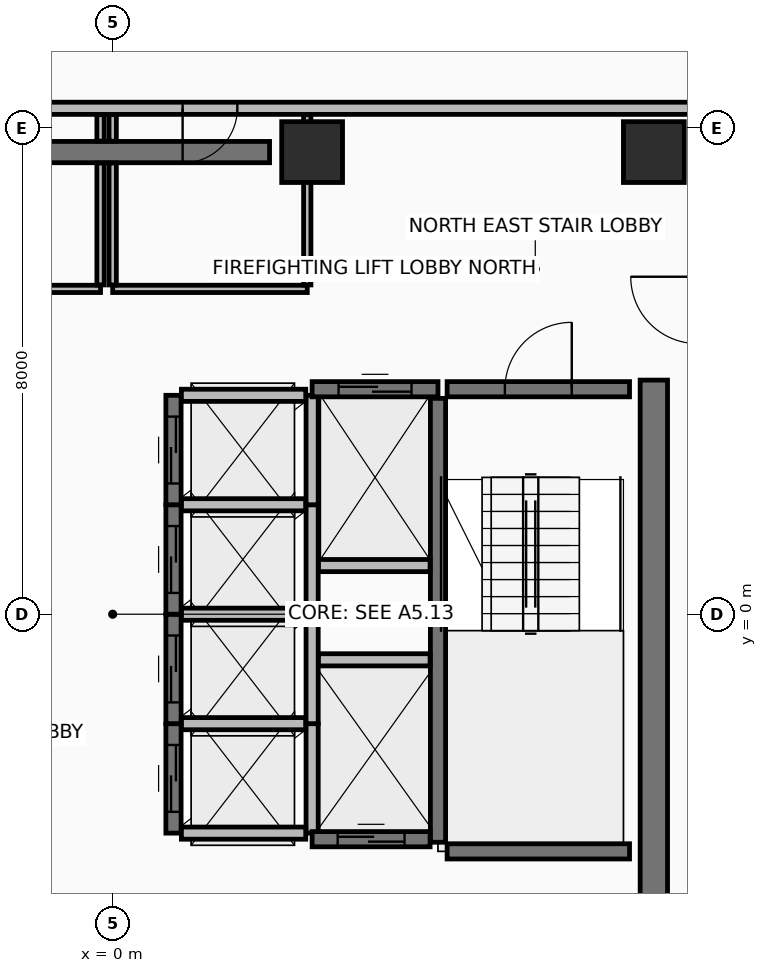
"""IFC4 building model, lengths in metres.
Left out: names, types, materials, properties, quantities, classifications, styles, units other than length and angle.
Written with IfcOpenShell. Run it as: python <this file> out.ifc"""

import sys

from ifc_helpers import new_model, si_unit, direction, frame, frame_2d, origin, origin_2d, place, context, subcontext, project, spatial, rectangle, extrude, element, fill, save


model = new_model("IFC4")
c1 = context("Model", 3, precision=1e-05, world=origin(), true_north=direction((0.0, 1.0)))
c2 = subcontext(c1, "Body", "Model", "MODEL_VIEW")
j1 = project(units=[si_unit("LENGTHUNIT", "METRE"), si_unit("PLANEANGLEUNIT", "RADIAN")], contexts=[c1])
p1 = place(None, origin())
s1 = spatial("IfcSite", under=j1, at=p1, CompositionType="ELEMENT")
p2 = place(p1, origin())
s2 = spatial("IfcBuilding", under=s1, at=p2, CompositionType="ELEMENT")
p3 = place(p2, frame((0.0, 0.0, 294.35)))
s3 = spatial("IfcBuildingStorey", under=s2, at=p3, CompositionType="ELEMENT", Elevation=294.35)
for number, where, z_axis, x_axis in (
    (1, (8.9, 7.6, 0.0), (0.0, 0.0, 1.0), (1.0, 0.0, 0.0)),
    (2, (3.28, 7.6, 0.0), (0.0, 0.0, 1.0), (1.0, 0.0, 0.0)),
):
    element("IfcColumn", number, at=place(p3, frame(where, z_axis=z_axis, x_axis=x_axis)), inside=s3, PredefinedType="COLUMN", context=c2, shape_type="SweptSolid", body=[
        extrude(rectangle(XDim=1.0, YDim=1.0, at=origin_2d()), origin(), (0.0, 0.0, 1.0), 3.65),
    ])
p4 = place(p3, frame((-2.8, 7.6, 0.0), z_axis=(0.0, 0.0, 1.0), x_axis=(1.0, 0.0, 0.0)))
e3 = element("IfcWall", 3, at=p4, inside=s3, PredefinedType="SHEAR", context=c2, shape_type="SweptSolid", body=[
    extrude(rectangle(XDim=5.38, YDim=0.35, at=frame_2d((2.69, 0.0))), origin(), (0.0, 0.0, 1.0), 3.45),
])
p5 = place(p3, frame((8.9, -6.85, 0.0), z_axis=(0.0, 0.0, 1.0), x_axis=(0.0, 1.0, 0.0)))
e4 = element("IfcWall", 4, at=p5, inside=s3, PredefinedType="SHEAR", context=c2, shape_type="SweptSolid", body=[
    extrude(rectangle(XDim=10.7, YDim=0.45, at=frame_2d((5.35, 0.0))), origin(), (0.0, 0.0, 1.0), 3.45),
])
p6 = place(p3, frame((9.62, 8.32, 0.0), z_axis=(0.0, 0.0, 1.0), x_axis=(-1.0, 0.0, 0.0)))
e5 = element("IfcWall", 5, at=p6, inside=s3, PredefinedType="PARTITIONING", context=c2, shape_type="SweptSolid", body=[
    extrude(rectangle(XDim=19.24, YDim=0.2, at=frame_2d((9.62, 0.0))), origin(), (0.0, 0.0, 1.0), 2.945),
])
p7 = place(p6, frame((10.97, 0.0, 0.0)))
e6 = element("IfcOpeningElement", 6, at=p7, cuts=e5, PredefinedType="OPENING", context=c2, shape_type="SweptSolid", body=[
    extrude(rectangle(XDim=0.9, YDim=2.1, at=frame_2d((0.45, 1.05))), frame((0.0, 0.11, 0.0), z_axis=(0.0, -1.0, 0.0), x_axis=(1.0, 0.0, 0.0)), (0.0, 0.0, 1.0), 0.22),
])
p8 = place(p6, frame((7.57, 0.0, 0.0)))
e7 = element("IfcOpeningElement", 7, at=p8, cuts=e5, PredefinedType="OPENING", context=c2, shape_type="SweptSolid", body=[
    extrude(rectangle(XDim=0.9, YDim=2.1, at=frame_2d((0.45, 1.05))), frame((0.0, 0.11, 0.0), z_axis=(0.0, -1.0, 0.0), x_axis=(1.0, 0.0, 0.0)), (0.0, 0.0, 1.0), 0.22),
])
p9 = place(p6, frame((16.245, 0.0, 0.0)))
e8 = element("IfcOpeningElement", 8, at=p9, cuts=e5, PredefinedType="OPENING", context=c2, shape_type="SweptSolid", body=[
    extrude(rectangle(XDim=0.9, YDim=2.1, at=frame_2d((0.45, 1.05))), frame((0.0, 0.11, 0.0), z_axis=(0.0, -1.0, 0.0), x_axis=(1.0, 0.0, 0.0)), (0.0, 0.0, 1.0), 0.22),
])
p10 = place(p6, frame((14.295, 0.0, 0.0)))
e9 = element("IfcOpeningElement", 9, at=p10, cuts=e5, PredefinedType="OPENING", context=c2, shape_type="SweptSolid", body=[
    extrude(rectangle(XDim=0.9, YDim=2.1, at=frame_2d((0.45, 1.05))), frame((0.0, 0.11, 0.0), z_axis=(0.0, -1.0, 0.0), x_axis=(1.0, 0.0, 0.0)), (0.0, 0.0, 1.0), 0.22),
])
p11 = place(p3, frame((5.35, -3.75, 0.0), z_axis=(0.0, 0.0, 1.0), x_axis=(0.0, 1.0, 0.0)))
e10 = element("IfcWall", 10, at=p11, inside=s3, PredefinedType="SHEAR", context=c2, shape_type="SweptSolid", body=[
    extrude(rectangle(XDim=7.3, YDim=0.25, at=frame_2d((3.65, 0.0))), origin(), (0.0, 0.0, 1.0), 3.45),
])
p12 = place(p3, frame((5.5, 3.7, 0.0), z_axis=(0.0, 0.0, 1.0), x_axis=(1.0, 0.0, 0.0)))
e11 = element("IfcWall", 11, at=p12, inside=s3, PredefinedType="SHEAR", context=c2, shape_type="SweptSolid", body=[
    extrude(rectangle(XDim=3.0, YDim=0.25, at=frame_2d((1.5, 0.0))), origin(), (0.0, 0.0, 1.0), 3.45),
])
p13 = place(p12, frame((0.95, 0.0, 0.0)))
e12 = element("IfcOpeningElement", 12, at=p13, cuts=e11, PredefinedType="OPENING", context=c2, shape_type="SweptSolid", body=[
    extrude(rectangle(XDim=1.1, YDim=2.15, at=frame_2d((0.55, 1.075))), frame((0.0, 0.135, 0.0), z_axis=(0.0, -1.0, 0.0), x_axis=(1.0, 0.0, 0.0)), (0.0, 0.0, 1.0), 0.27),
])
p14 = place(p3, frame((5.5, -3.9, 0.0), z_axis=(0.0, 0.0, 1.0), x_axis=(1.0, 0.0, 0.0)))
e13 = element("IfcWall", 13, at=p14, inside=s3, PredefinedType="SHEAR", context=c2, shape_type="SweptSolid", body=[
    extrude(rectangle(XDim=3.0, YDim=0.25, at=frame_2d((1.5, 0.0))), origin(), (0.0, 0.0, 1.0), 3.45),
])
p15 = place(p3, frame((1.0, -3.6, 0.0), z_axis=(0.0, 0.0, 1.0), x_axis=(0.0, 1.0, 0.0)))
e14 = element("IfcWall", 14, at=p15, inside=s3, PredefinedType="SHEAR", context=c2, shape_type="SweptSolid", body=[
    extrude(rectangle(XDim=1.8, YDim=0.25, at=frame_2d((0.9, 0.0))), origin(), (0.0, 0.0, 1.0), 3.45),
])
p16 = place(p15, frame((0.35, 0.0, 0.0)))
e15 = element("IfcOpeningElement", 15, at=p16, cuts=e14, PredefinedType="OPENING", context=c2, shape_type="SweptSolid", body=[
    extrude(rectangle(XDim=1.1, YDim=2.2, at=frame_2d((0.55, 1.1))), frame((0.0, 0.135, 0.0), z_axis=(0.0, -1.0, 0.0), x_axis=(1.0, 0.0, 0.0)), (0.0, 0.0, 1.0), 0.27),
])
p17 = place(p3, frame((3.28, -3.6, 0.0), z_axis=(0.0, 0.0, 1.0), x_axis=(0.0, 1.0, 0.0)))
e16 = element("IfcWall", 16, at=p17, inside=s3, PredefinedType="PARTITIONING", context=c2, shape_type="SweptSolid", body=[
    extrude(rectangle(XDim=1.8, YDim=0.2, at=frame_2d((0.9, 0.0))), origin(), (0.0, 0.0, 1.0), 3.45),
])
for number, where, z_axis, x_axis in (
    (17, (1.13, -3.6, 0.0), (0.0, 0.0, 1.0), (1.0, 0.0, 0.0)),
    (18, (1.13, -1.8, 0.0), (0.0, 0.0, 1.0), (1.0, 0.0, 0.0)),
):
    element("IfcWall", number, at=place(p3, frame(where, z_axis=z_axis, x_axis=x_axis)), inside=s3, PredefinedType="PARTITIONING", context=c2, shape_type="SweptSolid", body=[
        extrude(rectangle(XDim=2.045, YDim=0.2, at=frame_2d((1.022, 0.0))), origin(), (0.0, 0.0, 1.0), 3.45),
    ])
p18 = place(p3, frame((1.0, -1.8, 0.0), z_axis=(0.0, 0.0, 1.0), x_axis=(0.0, 1.0, 0.0)))
e19 = element("IfcWall", 19, at=p18, inside=s3, PredefinedType="SHEAR", context=c2, shape_type="SweptSolid", body=[
    extrude(rectangle(XDim=1.8, YDim=0.25, at=frame_2d((0.9, 0.0))), origin(), (0.0, 0.0, 1.0), 3.45),
])
p19 = place(p18, frame((0.35, 0.0, 0.0)))
e20 = element("IfcOpeningElement", 20, at=p19, cuts=e19, PredefinedType="OPENING", context=c2, shape_type="SweptSolid", body=[
    extrude(rectangle(XDim=1.1, YDim=2.2, at=frame_2d((0.55, 1.1))), frame((0.0, 0.135, 0.0), z_axis=(0.0, -1.0, 0.0), x_axis=(1.0, 0.0, 0.0)), (0.0, 0.0, 1.0), 0.27),
])
p20 = place(p3, frame((3.28, -1.8, 0.0), z_axis=(0.0, 0.0, 1.0), x_axis=(0.0, 1.0, 0.0)))
e21 = element("IfcWall", 21, at=p20, inside=s3, PredefinedType="PARTITIONING", context=c2, shape_type="SweptSolid", body=[
    extrude(rectangle(XDim=1.8, YDim=0.2, at=frame_2d((0.9, 0.0))), origin(), (0.0, 0.0, 1.0), 3.45),
])
p21 = place(p3, frame((1.13, 0.0, 0.0), z_axis=(0.0, 0.0, 1.0), x_axis=(1.0, 0.0, 0.0)))
e22 = element("IfcWall", 22, at=p21, inside=s3, PredefinedType="PARTITIONING", context=c2, shape_type="SweptSolid", body=[
    extrude(rectangle(XDim=2.045, YDim=0.2, at=frame_2d((1.022, 0.0))), origin(), (0.0, 0.0, 1.0), 3.45),
])
p22 = place(p3, frame((1.0, 0.0, 0.0), z_axis=(0.0, 0.0, 1.0), x_axis=(0.0, 1.0, 0.0)))
e23 = element("IfcWall", 23, at=p22, inside=s3, PredefinedType="SHEAR", context=c2, shape_type="SweptSolid", body=[
    extrude(rectangle(XDim=1.8, YDim=0.25, at=frame_2d((0.9, 0.0))), origin(), (0.0, 0.0, 1.0), 3.45),
])
p23 = place(p22, frame((0.35, 0.0, 0.0)))
e24 = element("IfcOpeningElement", 24, at=p23, cuts=e23, PredefinedType="OPENING", context=c2, shape_type="SweptSolid", body=[
    extrude(rectangle(XDim=1.1, YDim=2.2, at=frame_2d((0.55, 1.1))), frame((0.0, 0.135, 0.0), z_axis=(0.0, -1.0, 0.0), x_axis=(1.0, 0.0, 0.0)), (0.0, 0.0, 1.0), 0.27),
])
p24 = place(p3, frame((3.28, 0.0, 0.0), z_axis=(0.0, 0.0, 1.0), x_axis=(0.0, 1.0, 0.0)))
e25 = element("IfcWall", 25, at=p24, inside=s3, PredefinedType="PARTITIONING", context=c2, shape_type="SweptSolid", body=[
    extrude(rectangle(XDim=1.8, YDim=0.2, at=frame_2d((0.9, 0.0))), origin(), (0.0, 0.0, 1.0), 3.45),
])
p25 = place(p3, frame((1.13, 1.8, 0.0), z_axis=(0.0, 0.0, 1.0), x_axis=(1.0, 0.0, 0.0)))
e26 = element("IfcWall", 26, at=p25, inside=s3, PredefinedType="PARTITIONING", context=c2, shape_type="SweptSolid", body=[
    extrude(rectangle(XDim=2.045, YDim=0.2, at=frame_2d((1.022, 0.0))), origin(), (0.0, 0.0, 1.0), 3.45),
])
p26 = place(p3, frame((1.0, 1.8, 0.0), z_axis=(0.0, 0.0, 1.0), x_axis=(0.0, 1.0, 0.0)))
e27 = element("IfcWall", 27, at=p26, inside=s3, PredefinedType="SHEAR", context=c2, shape_type="SweptSolid", body=[
    extrude(rectangle(XDim=1.8, YDim=0.25, at=frame_2d((0.9, 0.0))), origin(), (0.0, 0.0, 1.0), 3.45),
])
p27 = place(p26, frame((0.35, 0.0, 0.0)))
e28 = element("IfcOpeningElement", 28, at=p27, cuts=e27, PredefinedType="OPENING", context=c2, shape_type="SweptSolid", body=[
    extrude(rectangle(XDim=1.1, YDim=2.2, at=frame_2d((0.55, 1.1))), frame((0.0, 0.135, 0.0), z_axis=(0.0, -1.0, 0.0), x_axis=(1.0, 0.0, 0.0)), (0.0, 0.0, 1.0), 0.27),
])
p28 = place(p3, frame((3.28, 1.8, 0.0), z_axis=(0.0, 0.0, 1.0), x_axis=(0.0, 1.0, 0.0)))
e29 = element("IfcWall", 29, at=p28, inside=s3, PredefinedType="PARTITIONING", context=c2, shape_type="SweptSolid", body=[
    extrude(rectangle(XDim=1.8, YDim=0.2, at=frame_2d((0.9, 0.0))), origin(), (0.0, 0.0, 1.0), 3.45),
])
p29 = place(p3, frame((1.13, 3.6, 0.0), z_axis=(0.0, 0.0, 1.0), x_axis=(1.0, 0.0, 0.0)))
e30 = element("IfcWall", 30, at=p29, inside=s3, PredefinedType="PARTITIONING", context=c2, shape_type="SweptSolid", body=[
    extrude(rectangle(XDim=2.045, YDim=0.2, at=frame_2d((1.022, 0.0))), origin(), (0.0, 0.0, 1.0), 2.745),
])
p30 = place(p3, frame((3.28, 3.7, 0.0), z_axis=(0.0, 0.0, 1.0), x_axis=(1.0, 0.0, 0.0)))
e31 = element("IfcWall", 31, at=p30, inside=s3, PredefinedType="SHEAR", context=c2, shape_type="SweptSolid", body=[
    extrude(rectangle(XDim=2.07, YDim=0.25, at=frame_2d((1.035, 0.0))), origin(), (0.0, 0.0, 1.0), 3.45),
])
p31 = place(p30, frame((0.435, 0.0, 0.0)))
e32 = element("IfcOpeningElement", 32, at=p31, cuts=e31, PredefinedType="OPENING", context=c2, shape_type="SweptSolid", body=[
    extrude(rectangle(XDim=1.2, YDim=2.2, at=frame_2d((0.6, 1.1))), frame((0.0, 0.135, 0.0), z_axis=(0.0, -1.0, 0.0), x_axis=(1.0, 0.0, 0.0)), (0.0, 0.0, 1.0), 0.27),
])
p32 = place(p3, frame((3.385, 0.8, 0.0), z_axis=(0.0, 0.0, 1.0), x_axis=(1.0, 0.0, 0.0)))
e33 = element("IfcWall", 33, at=p32, inside=s3, PredefinedType="PARTITIONING", context=c2, shape_type="SweptSolid", body=[
    extrude(rectangle(XDim=1.835, YDim=0.2, at=frame_2d((0.917, 0.0))), origin(), (0.0, 0.0, 1.0), 3.45),
])
p33 = place(p3, frame((3.28, -3.7, 0.0), z_axis=(0.0, 0.0, 1.0), x_axis=(1.0, 0.0, 0.0)))
e34 = element("IfcWall", 34, at=p33, inside=s3, PredefinedType="SHEAR", context=c2, shape_type="SweptSolid", body=[
    extrude(rectangle(XDim=1.94, YDim=0.25, at=frame_2d((0.97, 0.0))), origin(), (0.0, 0.0, 1.0), 3.45),
])
p34 = place(p33, frame((0.42, 0.0, 0.0)))
e35 = element("IfcOpeningElement", 35, at=p34, cuts=e34, PredefinedType="OPENING", context=c2, shape_type="SweptSolid", body=[
    extrude(rectangle(XDim=1.1, YDim=2.2, at=frame_2d((0.55, 1.1))), frame((0.0, 0.135, 0.0), z_axis=(0.0, -1.0, 0.0), x_axis=(1.0, 0.0, 0.0)), (0.0, 0.0, 1.0), 0.27),
])
p35 = place(p3, frame((3.385, -0.75, 0.0), z_axis=(0.0, 0.0, 1.0), x_axis=(1.0, 0.0, 0.0)))
e36 = element("IfcWall", 36, at=p35, inside=s3, PredefinedType="PARTITIONING", context=c2, shape_type="SweptSolid", body=[
    extrude(rectangle(XDim=1.835, YDim=0.2, at=frame_2d((0.917, 0.0))), origin(), (0.0, 0.0, 1.0), 3.45),
])
p36 = place(p3, frame((-3.4, 5.35, 0.0), z_axis=(0.0, 0.0, 1.0), x_axis=(1.0, 0.0, 0.0)))
e37 = element("IfcWall", 37, at=p36, inside=s3, PredefinedType="PARTITIONING", context=c2, shape_type="SweptSolid", body=[
    extrude(rectangle(XDim=3.2, YDim=0.12, at=frame_2d((1.6, 0.0))), origin(), (0.0, 0.0, 1.0), 3.45),
])
p37 = place(p3, frame((-0.2, 5.415, 0.0), z_axis=(0.0, 0.0, 1.0), x_axis=(0.0, 1.0, 0.0)))
e38 = element("IfcWall", 38, at=p37, inside=s3, PredefinedType="PARTITIONING", context=c2, shape_type="SweptSolid", body=[
    extrude(rectangle(XDim=2.005, YDim=0.12, at=frame_2d((1.002, 0.0))), origin(), (0.0, 0.0, 1.0), 2.745),
])
p38 = place(p3, frame((-0.2, 7.78, 0.0), z_axis=(0.0, 0.0, 1.0), x_axis=(0.0, 1.0, 0.0)))
e39 = element("IfcWall", 39, at=p38, inside=s3, PredefinedType="PARTITIONING", context=c2, shape_type="SweptSolid", body=[
    extrude(rectangle(XDim=0.435, YDim=0.12, at=frame_2d((0.218, 0.0))), origin(), (0.0, 0.0, 1.0), 2.745),
])
p39 = place(p3, frame((0.0, 5.35, 0.0), z_axis=(0.0, 0.0, 1.0), x_axis=(1.0, 0.0, 0.0)))
e40 = element("IfcWall", 40, at=p39, inside=s3, PredefinedType="PARTITIONING", context=c2, shape_type="SweptSolid", body=[
    extrude(rectangle(XDim=3.2, YDim=0.12, at=frame_2d((1.6, 0.0))), origin(), (0.0, 0.0, 1.0), 2.745),
])
p40 = place(p3, frame((3.2, 5.415, 0.0), z_axis=(0.0, 0.0, 1.0), x_axis=(0.0, 1.0, 0.0)))
e41 = element("IfcWall", 41, at=p40, inside=s3, PredefinedType="PARTITIONING", context=c2, shape_type="SweptSolid", body=[
    extrude(rectangle(XDim=2.8, YDim=0.12, at=frame_2d((1.4, 0.0))), origin(), (0.0, 0.0, 1.0), 2.745),
])
p41 = place(p3, frame((0.0, 8.215, 0.0), z_axis=(0.0, 0.0, 1.0), x_axis=(0.0, -1.0, 0.0)))
e42 = element("IfcWall", 42, at=p41, inside=s3, PredefinedType="PARTITIONING", context=c2, shape_type="SweptSolid", body=[
    extrude(rectangle(XDim=0.435, YDim=0.12, at=frame_2d((0.218, 0.0))), origin(), (0.0, 0.0, 1.0), 2.745),
])
p42 = place(p3, frame((0.0, 7.42, 0.0), z_axis=(0.0, 0.0, 1.0), x_axis=(0.0, -1.0, 0.0)))
e43 = element("IfcWall", 43, at=p42, inside=s3, PredefinedType="PARTITIONING", context=c2, shape_type="SweptSolid", body=[
    extrude(rectangle(XDim=2.005, YDim=0.12, at=frame_2d((1.002, 0.0))), origin(), (0.0, 0.0, 1.0), 2.745),
])
p43 = place(p13, frame((1.1, 0.0, 0.0), z_axis=(0.0, 0.0, 1.0), x_axis=(-1.0, 0.0, 0.0)))
e44 = element("IfcDoor", 44, at=p43, inside=s3, OperationType="SINGLE_SWING_LEFT", PredefinedType="DOOR", context=c2, shape_type="SweptSolid", body=[
    extrude(rectangle(XDim=1.1, YDim=2.15, at=frame_2d((0.55, 1.075))), frame((0.0, 0.025, 0.0), z_axis=(0.0, -1.0, 0.0), x_axis=(1.0, 0.0, 0.0)), (0.0, 0.0, 1.0), 0.05),
])
fill(e12, e44)
p44 = place(p16, origin())
e45 = element("IfcDoor", 45, at=p44, inside=s3, OperationType="SLIDING_TO_LEFT", PredefinedType="DOOR", context=c2, shape_type="SweptSolid", body=[
    extrude(rectangle(XDim=1.1, YDim=2.2, at=frame_2d((0.55, 1.1))), frame((0.0, 0.025, 0.0), z_axis=(0.0, -1.0, 0.0), x_axis=(1.0, 0.0, 0.0)), (0.0, 0.0, 1.0), 0.05),
])
fill(e15, e45)
p45 = place(p19, origin())
e46 = element("IfcDoor", 46, at=p45, inside=s3, OperationType="SLIDING_TO_LEFT", PredefinedType="DOOR", context=c2, shape_type="SweptSolid", body=[
    extrude(rectangle(XDim=1.1, YDim=2.2, at=frame_2d((0.55, 1.1))), frame((0.0, 0.025, 0.0), z_axis=(0.0, -1.0, 0.0), x_axis=(1.0, 0.0, 0.0)), (0.0, 0.0, 1.0), 0.05),
])
fill(e20, e46)
p46 = place(p23, origin())
e47 = element("IfcDoor", 47, at=p46, inside=s3, OperationType="SLIDING_TO_LEFT", PredefinedType="DOOR", context=c2, shape_type="SweptSolid", body=[
    extrude(rectangle(XDim=1.1, YDim=2.2, at=frame_2d((0.55, 1.1))), frame((0.0, 0.025, 0.0), z_axis=(0.0, -1.0, 0.0), x_axis=(1.0, 0.0, 0.0)), (0.0, 0.0, 1.0), 0.05),
])
fill(e24, e47)
p47 = place(p27, origin())
e48 = element("IfcDoor", 48, at=p47, inside=s3, OperationType="SLIDING_TO_LEFT", PredefinedType="DOOR", context=c2, shape_type="SweptSolid", body=[
    extrude(rectangle(XDim=1.1, YDim=2.2, at=frame_2d((0.55, 1.1))), frame((0.0, 0.025, 0.0), z_axis=(0.0, -1.0, 0.0), x_axis=(1.0, 0.0, 0.0)), (0.0, 0.0, 1.0), 0.05),
])
fill(e28, e48)
p48 = place(p31, origin())
e49 = element("IfcDoor", 49, at=p48, inside=s3, OperationType="SLIDING_TO_RIGHT", PredefinedType="DOOR", context=c2, shape_type="SweptSolid", body=[
    extrude(rectangle(XDim=1.2, YDim=2.2, at=frame_2d((0.6, 1.1))), frame((0.0, 0.025, 0.0), z_axis=(0.0, -1.0, 0.0), x_axis=(1.0, 0.0, 0.0)), (0.0, 0.0, 1.0), 0.05),
])
fill(e32, e49)
p49 = place(p34, origin())
e50 = element("IfcDoor", 50, at=p49, inside=s3, OperationType="SLIDING_TO_LEFT", PredefinedType="DOOR", context=c2, shape_type="SweptSolid", body=[
    extrude(rectangle(XDim=1.1, YDim=2.2, at=frame_2d((0.55, 1.1))), frame((0.0, 0.025, 0.0), z_axis=(0.0, -1.0, 0.0), x_axis=(1.0, 0.0, 0.0)), (0.0, 0.0, 1.0), 0.05),
])
fill(e35, e50)
p50 = place(p8, frame((0.9, 0.0, 0.0), z_axis=(0.0, 0.0, 1.0), x_axis=(-1.0, 0.0, 0.0)))
e51 = element("IfcDoor", 51, at=p50, inside=s3, OperationType="SINGLE_SWING_LEFT", PredefinedType="DOOR", context=c2, shape_type="SweptSolid", body=[
    extrude(rectangle(XDim=0.9, YDim=2.1, at=frame_2d((0.45, 1.05))), frame((0.0, 0.025, 0.0), z_axis=(0.0, -1.0, 0.0), x_axis=(1.0, 0.0, 0.0)), (0.0, 0.0, 1.0), 0.05),
])
fill(e7, e51)
save(model, sys.argv[1])
